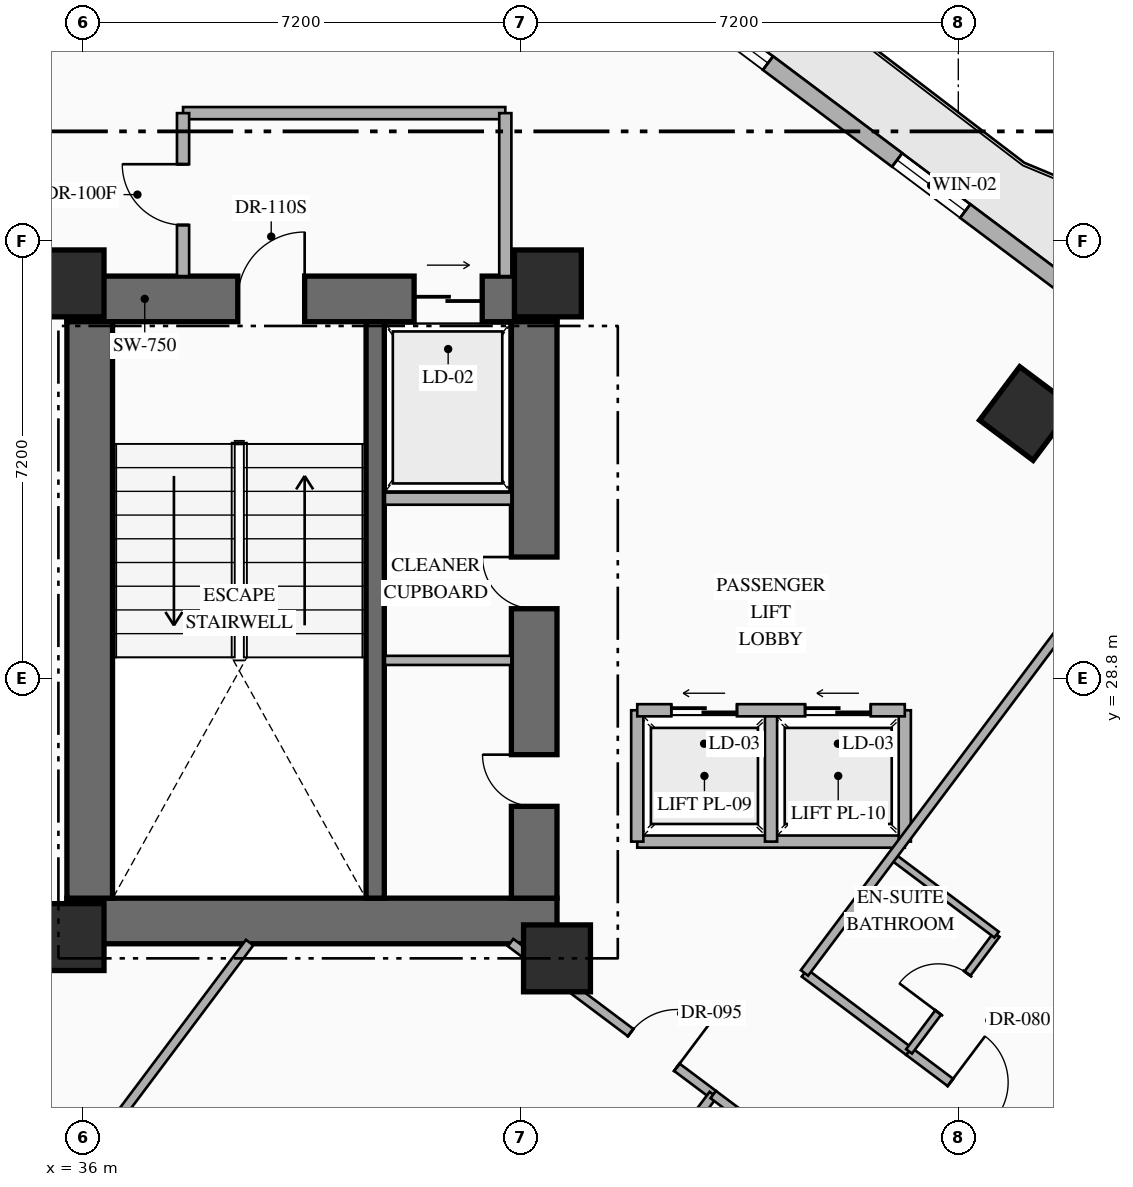
"""IFC4 building model, lengths in metres.
Left out: names, types, materials, properties, quantities, classifications, styles, units other than length and angle.
Written with IfcOpenShell. Run it as: python <this file> out.ifc"""

import sys

from ifc_helpers import new_model, si_unit, direction, frame, frame_2d, origin, origin_2d, place, context, subcontext, project, spatial, rectangle, hollow_rectangle, extrude, element, fill, save


model = new_model("IFC4")
c1 = context("Model", 3, precision=1e-05, world=origin(), true_north=direction((0.0, 1.0)))
c2 = subcontext(c1, "Body", "Model", "MODEL_VIEW")
j1 = project(units=[si_unit("LENGTHUNIT", "METRE"), si_unit("PLANEANGLEUNIT", "RADIAN")], contexts=[c1])
p1 = place(None, origin())
s1 = spatial("IfcSite", under=j1, at=p1, CompositionType="ELEMENT")
p2 = place(p1, origin())
s2 = spatial("IfcBuilding", under=s1, at=p2, CompositionType="ELEMENT")
p3 = place(p2, frame((0.0, 0.0, 63.4)))
s3 = spatial("IfcBuildingStorey", under=s2, at=p3, CompositionType="ELEMENT", Elevation=63.4)
p4 = place(p3, frame((35.74, 24.815, 0.0), z_axis=(0.0, 0.0, 1.0), x_axis=(1.0, 0.0, 0.0)))
e1 = element("IfcWall", 1, at=p4, inside=s3, PredefinedType="SHEAR", context=c2, shape_type="SweptSolid", body=[
    extrude(rectangle(XDim=8.06, YDim=0.75, at=frame_2d((4.03, 0.0))), origin(), (0.0, 0.0, 1.0), 3.35),
])
p5 = place(p3, frame((35.74, 35.045, 0.0), z_axis=(0.0, 0.0, 1.0), x_axis=(1.0, 0.0, 0.0)))
e2 = element("IfcWall", 2, at=p5, inside=s3, PredefinedType="SHEAR", context=c2, shape_type="SweptSolid", body=[
    extrude(rectangle(XDim=8.06, YDim=0.75, at=frame_2d((4.03, 0.0))), origin(), (0.0, 0.0, 1.0), 3.35),
])
p6 = place(p5, frame((2.81, 0.0, 0.0)))
e3 = element("IfcOpeningElement", 3, at=p6, cuts=e2, PredefinedType="OPENING", context=c2, shape_type="SweptSolid", body=[
    extrude(rectangle(XDim=1.1, YDim=2.2, at=frame_2d((0.55, 1.1))), frame((0.0, 0.385, 0.0), z_axis=(0.0, -1.0, 0.0), x_axis=(1.0, 0.0, 0.0)), (0.0, 0.0, 1.0), 0.77),
])
p7 = place(p5, frame((5.71, 0.0, 0.0)))
e4 = element("IfcOpeningElement", 4, at=p7, cuts=e2, PredefinedType="OPENING", context=c2, shape_type="SweptSolid", body=[
    extrude(rectangle(XDim=1.12, YDim=2.15, at=frame_2d((0.56, 1.075))), frame((0.0, 0.385, 0.0), z_axis=(0.0, -1.0, 0.0), x_axis=(1.0, 0.0, 0.0)), (0.0, 0.0, 1.0), 0.77),
])
p8 = place(p3, frame((36.115, 25.19, 0.0), z_axis=(0.0, 0.0, 1.0), x_axis=(0.0, 1.0, 0.0)))
e5 = element("IfcWall", 5, at=p8, inside=s3, PredefinedType="SHEAR", context=c2, shape_type="SweptSolid", body=[
    extrude(rectangle(XDim=9.48, YDim=0.75, at=frame_2d((4.74, 0.0))), origin(), (0.0, 0.0, 1.0), 3.35),
])
p9 = place(p3, frame((43.425, 25.19, 0.0), z_axis=(0.0, 0.0, 1.0), x_axis=(0.0, 1.0, 0.0)))
e6 = element("IfcWall", 6, at=p9, inside=s3, PredefinedType="SHEAR", context=c2, shape_type="SweptSolid", body=[
    extrude(rectangle(XDim=9.48, YDim=0.75, at=frame_2d((4.74, 0.0))), origin(), (0.0, 0.0, 1.0), 3.35),
])
p10 = place(p9, frame((1.51, 0.0, 0.0)))
e7 = element("IfcOpeningElement", 7, at=p10, cuts=e6, PredefinedType="OPENING", context=c2, shape_type="SweptSolid", body=[
    extrude(rectangle(XDim=0.85, YDim=2.08, at=frame_2d((0.425, 1.04))), frame((0.0, 0.385, 0.0), z_axis=(0.0, -1.0, 0.0), x_axis=(1.0, 0.0, 0.0)), (0.0, 0.0, 1.0), 0.77),
])
p11 = place(p9, frame((4.76, 0.0, 0.0)))
e8 = element("IfcOpeningElement", 8, at=p11, cuts=e6, PredefinedType="OPENING", context=c2, shape_type="SweptSolid", body=[
    extrude(rectangle(XDim=0.85, YDim=2.08, at=frame_2d((0.425, 1.04))), frame((0.0, 0.385, 0.0), z_axis=(0.0, -1.0, 0.0), x_axis=(1.0, 0.0, 0.0)), (0.0, 0.0, 1.0), 0.77),
])
p12 = place(p3, frame((40.81, 25.19, 0.0), z_axis=(0.0, 0.0, 1.0), x_axis=(0.0, 1.0, 0.0)))
e9 = element("IfcWall", 9, at=p12, inside=s3, PredefinedType="SHEAR", context=c2, shape_type="SweptSolid", body=[
    extrude(rectangle(XDim=9.48, YDim=0.3, at=frame_2d((4.74, 0.0))), origin(), (0.0, 0.0, 1.0), 3.35),
])
for number, where, z_axis, x_axis in (
    (10, (35.8, 24.55, 0.0), (0.0, 0.0, 1.0), (1.0, 0.0, 0.0)),
    (11, (43.8, 24.2, 0.0), (0.0, 0.0, 1.0), (1.0, 0.0, 0.0)),
    (12, (35.8, 35.3, 0.0), (0.0, 0.0, 1.0), (1.0, 0.0, 0.0)),
    (13, (43.65, 35.3, 0.0), (0.0, 0.0, 1.0), (1.0, 0.0, 0.0)),
):
    element("IfcColumn", number, at=place(p3, frame(where, z_axis=z_axis, x_axis=x_axis)), inside=s3, PredefinedType="COLUMN", context=c2, shape_type="SweptSolid", body=[
        extrude(rectangle(XDim=1.1, YDim=1.1, at=origin_2d()), origin(), (0.0, 0.0, 1.0), 3.35),
    ])
p13 = place(p3, frame((51.52, 33.16, 0.0), z_axis=(0.0, 0.0, 1.0), x_axis=(0.799999996291, -0.600000004945, 0.0)))
e14 = element("IfcColumn", 14, at=p13, inside=s3, PredefinedType="COLUMN", context=c2, shape_type="SweptSolid", body=[
    extrude(hollow_rectangle(XDim=1.1, YDim=1.1, WallThickness=0.04, at=origin_2d()), origin(), (0.0, 0.0, 1.0), 3.35),
])
p14 = place(p3, frame((44.86, 40.73, 0.0), z_axis=(0.0, 0.0, 1.0), x_axis=(0.800006902154, -0.599990797017, 0.0)))
e15 = element("IfcWall", 15, at=p14, inside=s3, PredefinedType="STANDARD", context=c2, shape_type="SweptSolid", body=[
    extrude(rectangle(XDim=29.712, YDim=0.28, at=frame_2d((14.856, 0.0))), origin(), (0.0, 0.0, 1.0), 3.13),
])
p15 = place(p14, frame((14.249, 0.0, 0.0)))
e16 = element("IfcOpeningElement", 16, at=p15, cuts=e15, PredefinedType="OPENING", context=c2, shape_type="SweptSolid", body=[
    extrude(rectangle(XDim=1.1, YDim=2.2, at=frame_2d((0.55, 1.1))), frame((0.0, 0.15, 0.0), z_axis=(0.0, -1.0, 0.0), x_axis=(1.0, 0.0, 0.0)), (0.0, 0.0, 1.0), 0.3),
])
p16 = place(p14, frame((1.612, 0.0, 0.85)))
e17 = element("IfcOpeningElement", 17, at=p16, cuts=e15, PredefinedType="OPENING", context=c2, shape_type="SweptSolid", body=[
    extrude(rectangle(XDim=1.4, YDim=1.8, at=frame_2d((0.7, 0.9))), frame((0.0, 0.15, 0.0), z_axis=(0.0, -1.0, 0.0), x_axis=(1.0, 0.0, 0.0)), (0.0, 0.0, 1.0), 0.3),
])
p17 = place(p14, frame((5.667, 0.0, 0.85)))
e18 = element("IfcOpeningElement", 18, at=p17, cuts=e15, PredefinedType="OPENING", context=c2, shape_type="SweptSolid", body=[
    extrude(rectangle(XDim=1.4, YDim=1.8, at=frame_2d((0.7, 0.9))), frame((0.0, 0.15, 0.0), z_axis=(0.0, -1.0, 0.0), x_axis=(1.0, 0.0, 0.0)), (0.0, 0.0, 1.0), 0.3),
])
p18 = place(p14, frame((9.912, 0.0, 0.85)))
e19 = element("IfcOpeningElement", 19, at=p18, cuts=e15, PredefinedType="OPENING", context=c2, shape_type="SweptSolid", body=[
    extrude(rectangle(XDim=1.4, YDim=1.8, at=frame_2d((0.7, 0.9))), frame((0.0, 0.15, 0.0), z_axis=(0.0, -1.0, 0.0), x_axis=(1.0, 0.0, 0.0)), (0.0, 0.0, 1.0), 0.3),
])
p19 = place(p14, frame((19.528, 0.0, 0.85)))
e20 = element("IfcOpeningElement", 20, at=p19, cuts=e15, PredefinedType="OPENING", context=c2, shape_type="SweptSolid", body=[
    extrude(rectangle(XDim=1.4, YDim=1.8, at=frame_2d((0.7, 0.9))), frame((0.0, 0.15, 0.0), z_axis=(0.0, -1.0, 0.0), x_axis=(1.0, 0.0, 0.0)), (0.0, 0.0, 1.0), 0.3),
])
p20 = place(p14, frame((23.451, 0.0, 0.85)))
e21 = element("IfcOpeningElement", 21, at=p20, cuts=e15, PredefinedType="OPENING", context=c2, shape_type="SweptSolid", body=[
    extrude(rectangle(XDim=1.4, YDim=1.8, at=frame_2d((0.7, 0.9))), frame((0.0, 0.15, 0.0), z_axis=(0.0, -1.0, 0.0), x_axis=(1.0, 0.0, 0.0)), (0.0, 0.0, 1.0), 0.3),
])
p21 = place(p14, frame((27.852, 0.0, 0.85)))
e22 = element("IfcOpeningElement", 22, at=p21, cuts=e15, PredefinedType="OPENING", context=c2, shape_type="SweptSolid", body=[
    extrude(rectangle(XDim=1.4, YDim=1.8, at=frame_2d((0.7, 0.9))), frame((0.0, 0.15, 0.0), z_axis=(0.0, -1.0, 0.0), x_axis=(1.0, 0.0, 0.0)), (0.0, 0.0, 1.0), 0.3),
])
p22 = place(p3, frame((40.97, 31.76, 0.0), z_axis=(0.0, 0.0, 1.0), x_axis=(1.0, 0.0, 0.0)))
e23 = element("IfcWall", 23, at=p22, inside=s3, PredefinedType="STANDARD", context=c2, shape_type="SweptSolid", body=[
    extrude(rectangle(XDim=2.08, YDim=0.2, at=frame_2d((1.04, 0.0))), origin(), (0.0, 0.0, 1.0), 3.13),
])
p23 = place(p3, frame((40.97, 29.1, 0.0), z_axis=(0.0, 0.0, 1.0), x_axis=(1.0, 0.0, 0.0)))
e24 = element("IfcWall", 24, at=p23, inside=s3, PredefinedType="PARTITIONING", context=c2, shape_type="SweptSolid", body=[
    extrude(rectangle(XDim=2.08, YDim=0.15, at=frame_2d((1.04, 0.0))), origin(), (0.0, 0.0, 1.0), 3.13),
])
p24 = place(p3, frame((37.65, 38.1, 0.0), z_axis=(0.0, 0.0, 1.0), x_axis=(1.0, 0.0, 0.0)))
e25 = element("IfcWall", 25, at=p24, inside=s3, PredefinedType="STANDARD", context=c2, shape_type="SweptSolid", body=[
    extrude(rectangle(XDim=5.3, YDim=0.2, at=frame_2d((2.65, 0.0))), origin(), (0.0, 0.0, 1.0), 3.13),
])
p25 = place(p3, frame((42.95, 35.42, 0.0), z_axis=(0.0, 0.0, 1.0), x_axis=(0.0, 1.0, 0.0)))
e26 = element("IfcWall", 26, at=p25, inside=s3, PredefinedType="STANDARD", context=c2, shape_type="SweptSolid", body=[
    extrude(rectangle(XDim=2.68, YDim=0.2, at=frame_2d((1.34, 0.0))), origin(), (0.0, 0.0, 1.0), 3.13),
])
p26 = place(p3, frame((37.65, 35.42, 0.0), z_axis=(0.0, 0.0, 1.0), x_axis=(0.0, 1.0, 0.0)))
e27 = element("IfcWall", 27, at=p26, inside=s3, PredefinedType="STANDARD", context=c2, shape_type="SweptSolid", body=[
    extrude(rectangle(XDim=2.68, YDim=0.2, at=frame_2d((1.34, 0.0))), origin(), (0.0, 0.0, 1.0), 3.13),
])
p27 = place(p26, frame((0.84, 0.0, 0.0)))
e28 = element("IfcOpeningElement", 28, at=p27, cuts=e27, PredefinedType="OPENING", context=c2, shape_type="SweptSolid", body=[
    extrude(rectangle(XDim=1.0, YDim=2.2, at=frame_2d((0.5, 1.1))), frame((0.0, 0.11, 0.0), z_axis=(0.0, -1.0, 0.0), x_axis=(1.0, 0.0, 0.0)), (0.0, 0.0, 1.0), 0.22),
])
p28 = place(p3, frame((45.12, 26.12, 0.0), z_axis=(0.0, 0.0, 1.0), x_axis=(1.0, 0.0, 0.0)))
e29 = element("IfcWall", 29, at=p28, inside=s3, PredefinedType="STANDARD", context=c2, shape_type="SweptSolid", body=[
    extrude(rectangle(XDim=4.4, YDim=0.2, at=frame_2d((2.2, 0.0))), origin(), (0.0, 0.0, 1.0), 3.13),
])
for number, where, z_axis, x_axis in (
    (30, (45.12, 26.12, 0.0), (0.0, 0.0, 1.0), (0.0, 1.0, 0.0)),
    (31, (49.52, 26.12, 0.0), (0.0, 0.0, 1.0), (0.0, 1.0, 0.0)),
    (32, (47.32, 26.12, 0.0), (0.0, 0.0, 1.0), (0.0, 1.0, 0.0)),
):
    element("IfcWall", number, at=place(p3, frame(where, z_axis=z_axis, x_axis=x_axis)), inside=s3, PredefinedType="STANDARD", context=c2, shape_type="SweptSolid", body=[
        extrude(rectangle(XDim=2.16, YDim=0.2, at=frame_2d((1.08, 0.0))), origin(), (0.0, 0.0, 1.0), 3.13),
    ])
p29 = place(p3, frame((45.12, 28.28, 0.0), z_axis=(0.0, 0.0, 1.0), x_axis=(1.0, 0.0, 0.0)))
e33 = element("IfcWall", 33, at=p29, inside=s3, PredefinedType="STANDARD", context=c2, shape_type="SweptSolid", body=[
    extrude(rectangle(XDim=4.4, YDim=0.2, at=frame_2d((2.2, 0.0))), origin(), (0.0, 0.0, 1.0), 3.13),
])
p30 = place(p29, frame((0.56, 0.0, 0.0)))
e34 = element("IfcOpeningElement", 34, at=p30, cuts=e33, PredefinedType="OPENING", context=c2, shape_type="SweptSolid", body=[
    extrude(rectangle(XDim=1.08, YDim=2.15, at=frame_2d((0.54, 1.075))), frame((0.0, 0.11, 0.0), z_axis=(0.0, -1.0, 0.0), x_axis=(1.0, 0.0, 0.0)), (0.0, 0.0, 1.0), 0.22),
])
p31 = place(p29, frame((2.76, 0.0, 0.0)))
e35 = element("IfcOpeningElement", 35, at=p31, cuts=e33, PredefinedType="OPENING", context=c2, shape_type="SweptSolid", body=[
    extrude(rectangle(XDim=1.08, YDim=2.15, at=frame_2d((0.54, 1.075))), frame((0.0, 0.11, 0.0), z_axis=(0.0, -1.0, 0.0), x_axis=(1.0, 0.0, 0.0)), (0.0, 0.0, 1.0), 0.22),
])
p32 = place(p3, frame((43.037, 24.46, 0.0), z_axis=(0.0, 0.0, 1.0), x_axis=(0.799971872363, -0.600037501685, 0.0)))
e36 = element("IfcWall", 36, at=p32, inside=s3, PredefinedType="PARTITIONING", context=c2, shape_type="SweptSolid", body=[
    extrude(rectangle(XDim=4.167, YDim=0.15, at=frame_2d((2.083, 0.0))), origin(), (0.0, 0.0, 1.0), 2.425),
])
p33 = place(p32, frame((2.468, 0.0, 0.0)))
e37 = element("IfcOpeningElement", 37, at=p33, cuts=e36, PredefinedType="OPENING", context=c2, shape_type="SweptSolid", body=[
    extrude(rectangle(XDim=0.95, YDim=2.15, at=frame_2d((0.475, 1.075))), frame((0.0, 0.085, 0.0), z_axis=(0.0, -1.0, 0.0), x_axis=(1.0, 0.0, 0.0)), (0.0, 0.0, 1.0), 0.17),
])
p34 = place(p3, frame((33.384, 17.312, 0.0), z_axis=(0.0, 0.0, 1.0), x_axis=(0.600008743659, 0.799993442181, 0.0)))
e38 = element("IfcWall", 38, at=p34, inside=s3, PredefinedType="PARTITIONING", context=c2, shape_type="SweptSolid", body=[
    extrude(rectangle(XDim=8.935, YDim=0.15, at=frame_2d((4.468, 0.0))), origin(), (0.0, 0.0, 1.0), 3.13),
])
p35 = place(p3, frame((39.464, 12.752, 0.0), z_axis=(0.0, 0.0, 1.0), x_axis=(0.6, 0.8, 0.0)))
e39 = element("IfcWall", 39, at=p35, inside=s3, PredefinedType="PARTITIONING", context=c2, shape_type="SweptSolid", body=[
    extrude(rectangle(XDim=11.51, YDim=0.15, at=frame_2d((5.755, 0.0))), origin(), (0.0, 0.0, 1.0), 3.13),
])
p36 = place(p3, frame((47.87, 23.96, 0.0), z_axis=(0.0, 0.0, 1.0), x_axis=(0.79998637334, -0.60001816845, 0.0)))
e40 = element("IfcWall", 40, at=p36, inside=s3, PredefinedType="PARTITIONING", context=c2, shape_type="SweptSolid", body=[
    extrude(rectangle(XDim=2.15, YDim=0.15, at=frame_2d((1.075, 0.0))), origin(), (0.0, 0.0, 1.0), 2.775),
])
p37 = place(p3, frame((49.59, 22.67, 0.0), z_axis=(0.0, 0.0, 1.0), x_axis=(0.800011056104, -0.599985258246, 0.0)))
e41 = element("IfcWall", 41, at=p37, inside=s3, PredefinedType="PARTITIONING", context=c2, shape_type="SweptSolid", body=[
    extrude(rectangle(XDim=2.65, YDim=0.15, at=frame_2d((1.325, 0.0))), origin(), (0.0, 0.0, 1.0), 2.775),
])
p38 = place(p37, frame((0.85, 0.0, 0.0)))
e42 = element("IfcOpeningElement", 42, at=p38, cuts=e41, PredefinedType="OPENING", context=c2, shape_type="SweptSolid", body=[
    extrude(rectangle(XDim=0.95, YDim=2.15, at=frame_2d((0.475, 1.075))), frame((0.0, 0.085, 0.0), z_axis=(0.0, -1.0, 0.0), x_axis=(1.0, 0.0, 0.0)), (0.0, 0.0, 1.0), 0.17),
])
p39 = place(p3, frame((49.59, 22.67, 0.0), z_axis=(0.0, 0.0, 1.0), x_axis=(0.599951172744, 0.800036618114, 0.0)))
e43 = element("IfcWall", 43, at=p39, inside=s3, PredefinedType="PARTITIONING", context=c2, shape_type="SweptSolid", body=[
    extrude(rectangle(XDim=2.4, YDim=0.12, at=frame_2d((1.2, 0.0))), origin(), (0.0, 0.0, 1.0), 3.13),
])
p40 = place(p39, frame((0.8, 0.0, 0.0)))
e44 = element("IfcOpeningElement", 44, at=p40, cuts=e43, PredefinedType="OPENING", context=c2, shape_type="SweptSolid", body=[
    extrude(rectangle(XDim=0.8, YDim=2.06, at=frame_2d((0.4, 1.03))), frame((0.0, 0.07, 0.0), z_axis=(0.0, -1.0, 0.0), x_axis=(1.0, 0.0, 0.0)), (0.0, 0.0, 1.0), 0.14),
])
p41 = place(p3, frame((49.31, 25.88, 0.0), z_axis=(0.0, 0.0, 1.0), x_axis=(0.800040880289, -0.59994548908, 0.0)))
e45 = element("IfcWall", 45, at=p41, inside=s3, PredefinedType="PARTITIONING", context=c2, shape_type="SweptSolid", body=[
    extrude(rectangle(XDim=2.15, YDim=0.12, at=frame_2d((1.075, 0.0))), origin(), (0.0, 0.0, 1.0), 3.13),
])
for number, where, z_axis, x_axis in (
    (46, (47.87, 23.96, 0.0), (0.0, 0.0, 1.0), (0.6, 0.8, 0.0)),
    (47, (51.71, 21.08, 0.0), (0.0, 0.0, 1.0), (0.6, 0.8, 0.0)),
):
    element("IfcWall", number, at=place(p3, frame(where, z_axis=z_axis, x_axis=x_axis)), inside=s3, PredefinedType="PARTITIONING", context=c2, shape_type="SweptSolid", body=[
        extrude(rectangle(XDim=11.55, YDim=0.15, at=frame_2d((5.775, 0.0))), origin(), (0.0, 0.0, 1.0), 3.13),
    ])
p42 = place(p3, frame((46.37, 21.96, 0.0), z_axis=(0.0, 0.0, 1.0), x_axis=(0.799977170108, -0.600030438649, 0.0)))
e48 = element("IfcWall", 48, at=p42, inside=s3, PredefinedType="PARTITIONING", context=c2, shape_type="SweptSolid", body=[
    extrude(rectangle(XDim=3.85, YDim=0.15, at=frame_2d((1.925, 0.0))), origin(), (0.0, 0.0, 1.0), 2.425),
])
p43 = place(p42, frame((1.45, 0.0, 0.0)))
e49 = element("IfcOpeningElement", 49, at=p43, cuts=e48, PredefinedType="OPENING", context=c2, shape_type="SweptSolid", body=[
    extrude(rectangle(XDim=0.95, YDim=2.15, at=frame_2d((0.475, 1.075))), frame((0.0, 0.085, 0.0), z_axis=(0.0, -1.0, 0.0), x_axis=(1.0, 0.0, 0.0)), (0.0, 0.0, 1.0), 0.17),
])
p44 = place(p16, origin())
e50 = element("IfcWindow", 50, at=p44, inside=s3, PartitioningType="SINGLE_PANEL", PredefinedType="WINDOW", context=c2, shape_type="SweptSolid", body=[
    extrude(rectangle(XDim=1.4, YDim=1.8, at=frame_2d((0.7, 0.9))), frame((0.0, 0.03, 0.0), z_axis=(0.0, -1.0, 0.0), x_axis=(1.0, 0.0, 0.0)), (0.0, 0.0, 1.0), 0.06),
])
fill(e17, e50)
p45 = place(p17, origin())
e51 = element("IfcWindow", 51, at=p45, inside=s3, PartitioningType="SINGLE_PANEL", PredefinedType="WINDOW", context=c2, shape_type="SweptSolid", body=[
    extrude(rectangle(XDim=1.4, YDim=1.8, at=frame_2d((0.7, 0.9))), frame((0.0, 0.03, 0.0), z_axis=(0.0, -1.0, 0.0), x_axis=(1.0, 0.0, 0.0)), (0.0, 0.0, 1.0), 0.06),
])
fill(e18, e51)
p46 = place(p6, origin())
e52 = element("IfcDoor", 52, at=p46, inside=s3, OperationType="SINGLE_SWING_RIGHT", PredefinedType="DOOR", context=c2, shape_type="SweptSolid", body=[
    extrude(rectangle(XDim=1.1, YDim=2.2, at=frame_2d((0.55, 1.1))), frame((0.0, 0.025, 0.0), z_axis=(0.0, -1.0, 0.0), x_axis=(1.0, 0.0, 0.0)), (0.0, 0.0, 1.0), 0.05),
])
fill(e3, e52)
p47 = place(p7, origin())
e53 = element("IfcDoor", 53, at=p47, inside=s3, OperationType="SLIDING_TO_RIGHT", PredefinedType="USERDEFINED", context=c2, shape_type="SweptSolid", body=[
    extrude(rectangle(XDim=1.12, YDim=2.15, at=frame_2d((0.56, 1.075))), frame((0.0, 0.025, 0.0), z_axis=(0.0, -1.0, 0.0), x_axis=(1.0, 0.0, 0.0)), (0.0, 0.0, 1.0), 0.05),
])
fill(e4, e53)
p48 = place(p10, origin())
e54 = element("IfcDoor", 54, at=p48, inside=s3, OperationType="SINGLE_SWING_RIGHT", PredefinedType="DOOR", context=c2, shape_type="SweptSolid", body=[
    extrude(rectangle(XDim=0.85, YDim=2.08, at=frame_2d((0.425, 1.04))), frame((0.0, 0.025, 0.0), z_axis=(0.0, -1.0, 0.0), x_axis=(1.0, 0.0, 0.0)), (0.0, 0.0, 1.0), 0.05),
])
fill(e7, e54)
p49 = place(p11, origin())
e55 = element("IfcDoor", 55, at=p49, inside=s3, OperationType="SINGLE_SWING_RIGHT", PredefinedType="DOOR", context=c2, shape_type="SweptSolid", body=[
    extrude(rectangle(XDim=0.85, YDim=2.08, at=frame_2d((0.425, 1.04))), frame((0.0, 0.025, 0.0), z_axis=(0.0, -1.0, 0.0), x_axis=(1.0, 0.0, 0.0)), (0.0, 0.0, 1.0), 0.05),
])
fill(e8, e55)
p50 = place(p27, origin())
e56 = element("IfcDoor", 56, at=p50, inside=s3, OperationType="SINGLE_SWING_RIGHT", PredefinedType="DOOR", context=c2, shape_type="SweptSolid", body=[
    extrude(rectangle(XDim=1.0, YDim=2.2, at=frame_2d((0.5, 1.1))), frame((0.0, 0.025, 0.0), z_axis=(0.0, -1.0, 0.0), x_axis=(1.0, 0.0, 0.0)), (0.0, 0.0, 1.0), 0.05),
])
fill(e28, e56)
p51 = place(p30, origin())
e57 = element("IfcDoor", 57, at=p51, inside=s3, OperationType="SLIDING_TO_LEFT", PredefinedType="USERDEFINED", context=c2, shape_type="SweptSolid", body=[
    extrude(rectangle(XDim=1.08, YDim=2.15, at=frame_2d((0.54, 1.075))), frame((0.0, 0.025, 0.0), z_axis=(0.0, -1.0, 0.0), x_axis=(1.0, 0.0, 0.0)), (0.0, 0.0, 1.0), 0.05),
])
fill(e34, e57)
p52 = place(p31, origin())
e58 = element("IfcDoor", 58, at=p52, inside=s3, OperationType="SLIDING_TO_LEFT", PredefinedType="USERDEFINED", context=c2, shape_type="SweptSolid", body=[
    extrude(rectangle(XDim=1.08, YDim=2.15, at=frame_2d((0.54, 1.075))), frame((0.0, 0.025, 0.0), z_axis=(0.0, -1.0, 0.0), x_axis=(1.0, 0.0, 0.0)), (0.0, 0.0, 1.0), 0.05),
])
fill(e35, e58)
p53 = place(p33, origin())
e59 = element("IfcDoor", 59, at=p53, inside=s3, OperationType="SINGLE_SWING_RIGHT", PredefinedType="DOOR", context=c2, shape_type="SweptSolid", body=[
    extrude(rectangle(XDim=0.95, YDim=2.15, at=frame_2d((0.475, 1.075))), frame((0.0, 0.025, 0.0), z_axis=(0.0, -1.0, 0.0), x_axis=(1.0, 0.0, 0.0)), (0.0, 0.0, 1.0), 0.05),
])
fill(e37, e59)
p54 = place(p38, origin())
e60 = element("IfcDoor", 60, at=p54, inside=s3, OperationType="SINGLE_SWING_LEFT", PredefinedType="DOOR", context=c2, shape_type="SweptSolid", body=[
    extrude(rectangle(XDim=0.95, YDim=2.15, at=frame_2d((0.475, 1.075))), frame((0.0, 0.025, 0.0), z_axis=(0.0, -1.0, 0.0), x_axis=(1.0, 0.0, 0.0)), (0.0, 0.0, 1.0), 0.05),
])
fill(e42, e60)
p55 = place(p40, origin())
e61 = element("IfcDoor", 61, at=p55, inside=s3, OperationType="SINGLE_SWING_LEFT", PredefinedType="DOOR", context=c2, shape_type="SweptSolid", body=[
    extrude(rectangle(XDim=0.8, YDim=2.06, at=frame_2d((0.4, 1.03))), frame((0.0, 0.025, 0.0), z_axis=(0.0, -1.0, 0.0), x_axis=(1.0, 0.0, 0.0)), (0.0, 0.0, 1.0), 0.05),
])
fill(e44, e61)
save(model, sys.argv[1])
